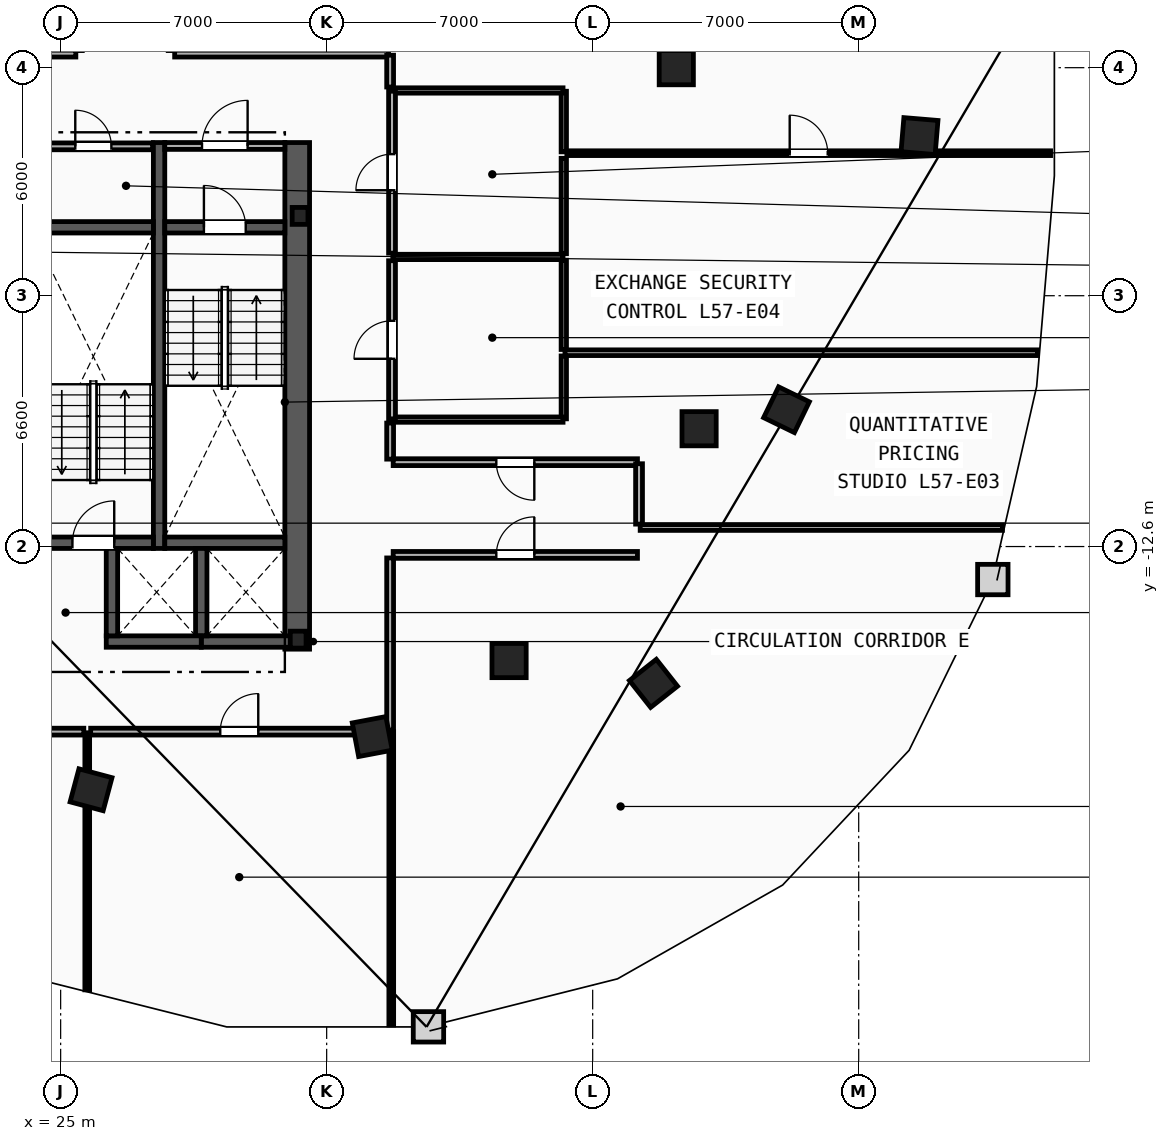
"""IFC4 building model, lengths in metres.
Left out: names, types, materials, properties, quantities, classifications, styles, units other than length and angle.
Written with IfcOpenShell. Run it as: python <this file> out.ifc"""

import sys

from ifc_helpers import new_model, si_unit, direction, frame, frame_2d, origin, origin_2d, place, context, subcontext, project, spatial, rectangle, i_section, extrude, element, fill, save


model = new_model("IFC4")
c1 = context("Model", 3, precision=1e-05, world=origin(), true_north=direction((0.0, 1.0)))
c2 = subcontext(c1, "Body", "Model", "MODEL_VIEW")
j1 = project(units=[si_unit("LENGTHUNIT", "METRE"), si_unit("PLANEANGLEUNIT", "RADIAN")], contexts=[c1])
p1 = place(None, origin())
s1 = spatial("IfcSite", under=j1, at=p1, CompositionType="ELEMENT")
p2 = place(p1, origin())
s2 = spatial("IfcBuilding", under=s1, at=p2, CompositionType="ELEMENT")
p3 = place(p2, frame((0.0, 0.0, 217.0)))
s3 = spatial("IfcBuildingStorey", under=s2, at=p3, CompositionType="ELEMENT", Elevation=217.0)
for number, where, z_axis, x_axis in (
    (1, (31.3, -3.9, 0.0), (0.0, 0.0, 1.0), (1.0, 0.0, 0.0)),
    (2, (31.25, -15.05, 0.0), (0.0, 0.0, 1.0), (1.0, 0.0, 0.0)),
):
    element("IfcColumn", number, at=place(p3, frame(where, z_axis=z_axis, x_axis=x_axis)), inside=s3, PredefinedType="COLUMN", context=c2, shape_type="SweptSolid", body=[
        extrude(i_section(OverallWidth=0.416, OverallDepth=0.446, WebThickness=0.039, FlangeThickness=0.063, FilletRadius=0.018, at=origin_2d()), origin(), (0.0, 0.0, 1.0), 3.6),
    ])
for number, where, z_axis, x_axis in (
    (3, (41.2, 0.0, 0.0), (0.0, 0.0, 1.0), (1.0, 0.0, 0.0)),
    (4, (41.8, -9.5, 0.0), (0.0, 0.0, 1.0), (1.0, 0.0, 0.0)),
    (5, (36.8, -15.6, 0.0), (0.0, 0.0, 1.0), (1.0, 0.0, 0.0)),
    (6, (25.8, -19.0, 0.0), (0.0, 0.0, 1.0), (0.966, -0.259, 0.0)),
    (7, (33.2, -17.6, 0.0), (0.0, 0.0, 1.0), (0.983, 0.186, 0.0)),
    (8, (40.6, -16.2, 0.0), (0.0, 0.0, 1.0), (0.785, 0.619, 0.0)),
    (9, (44.1, -9.0, 0.0), (0.0, 0.0, 1.0), (0.437, 0.899, 0.0)),
    (10, (47.6, -1.8, 0.0), (0.0, 0.0, 1.0), (0.084, 0.997, 0.0)),
):
    element("IfcColumn", number, at=place(p3, frame(where, z_axis=z_axis, x_axis=x_axis)), inside=s3, PredefinedType="COLUMN", context=c2, shape_type="SweptSolid", body=[
        extrude(rectangle(XDim=0.9, YDim=0.9, at=origin_2d()), origin(), (0.0, 0.0, 1.0), 3.6),
    ])
p4 = place(p3, frame((31.225, -15.3, 0.0), z_axis=(0.0, 0.0, 1.0), x_axis=(0.0, 1.0, 0.0)))
e11 = element("IfcWall", 11, at=p4, inside=s3, PredefinedType="SHEAR", context=c2, shape_type="SweptSolid", body=[
    extrude(rectangle(XDim=13.33, YDim=0.65, at=frame_2d((6.665, 0.0))), origin(), (0.0, 0.0, 1.0), 3.34),
])
p5 = place(p3, frame((27.59, -12.65, 0.0), z_axis=(0.0, 0.0, 1.0), x_axis=(0.0, 1.0, 0.0)))
e12 = element("IfcWall", 12, at=p5, inside=s3, PredefinedType="SHEAR", context=c2, shape_type="SweptSolid", body=[
    extrude(rectangle(XDim=10.68, YDim=0.3, at=frame_2d((5.34, 0.0))), origin(), (0.0, 0.0, 1.0), 3.34),
])
p6 = place(p3, frame((27.74, -4.2, 0.0), z_axis=(0.0, 0.0, 1.0), x_axis=(1.0, 0.0, 0.0)))
e13 = element("IfcWall", 13, at=p6, inside=s3, PredefinedType="SHEAR", context=c2, shape_type="SweptSolid", body=[
    extrude(rectangle(XDim=3.16, YDim=0.3, at=frame_2d((1.58, 0.0))), origin(), (0.0, 0.0, 1.0), 3.34),
])
p7 = place(p6, frame((1.03, 0.0, 0.0)))
e14 = element("IfcOpeningElement", 14, at=p7, cuts=e13, PredefinedType="OPENING", context=c2, shape_type="SweptSolid", body=[
    extrude(rectangle(XDim=1.1, YDim=2.15, at=frame_2d((0.55, 1.075))), frame((0.0, 0.16, 0.0), z_axis=(0.0, -1.0, 0.0), x_axis=(1.0, 0.0, 0.0)), (0.0, 0.0, 1.0), 0.32),
])
p8 = place(p3, frame((27.74, -12.5, 0.0), z_axis=(0.0, 0.0, 1.0), x_axis=(1.0, 0.0, 0.0)))
e15 = element("IfcWall", 15, at=p8, inside=s3, PredefinedType="SHEAR", context=c2, shape_type="SweptSolid", body=[
    extrude(rectangle(XDim=3.16, YDim=0.3, at=frame_2d((1.58, 0.0))), origin(), (0.0, 0.0, 1.0), 3.34),
])
p9 = place(p3, frame((24.28, -12.5, 0.0), z_axis=(0.0, 0.0, 1.0), x_axis=(1.0, 0.0, 0.0)))
e16 = element("IfcWall", 16, at=p9, inside=s3, PredefinedType="SHEAR", context=c2, shape_type="SweptSolid", body=[
    extrude(rectangle(XDim=3.16, YDim=0.3, at=frame_2d((1.58, 0.0))), origin(), (0.0, 0.0, 1.0), 3.34),
])
p10 = place(p9, frame((1.03, 0.0, 0.0)))
e17 = element("IfcOpeningElement", 17, at=p10, cuts=e16, PredefinedType="OPENING", context=c2, shape_type="SweptSolid", body=[
    extrude(rectangle(XDim=1.1, YDim=2.15, at=frame_2d((0.55, 1.075))), frame((0.0, 0.16, 0.0), z_axis=(0.0, -1.0, 0.0), x_axis=(1.0, 0.0, 0.0)), (0.0, 0.0, 1.0), 0.32),
])
p11 = place(p3, frame((24.28, -4.2, 0.0), z_axis=(0.0, 0.0, 1.0), x_axis=(1.0, 0.0, 0.0)))
e18 = element("IfcWall", 18, at=p11, inside=s3, PredefinedType="SHEAR", context=c2, shape_type="SweptSolid", body=[
    extrude(rectangle(XDim=3.16, YDim=0.3, at=frame_2d((1.58, 0.0))), origin(), (0.0, 0.0, 1.0), 3.34),
])
p12 = place(p3, frame((27.74, -2.06, 0.0), z_axis=(0.0, 0.0, 1.0), x_axis=(1.0, 0.0, 0.0)))
e19 = element("IfcWall", 19, at=p12, inside=s3, PredefinedType="PARTITIONING", context=c2, shape_type="SweptSolid", body=[
    extrude(rectangle(XDim=3.16, YDim=0.18, at=frame_2d((1.58, 0.0))), origin(), (0.0, 0.0, 1.0), 3.34),
])
p13 = place(p12, frame((0.98, 0.0, 0.0)))
e20 = element("IfcOpeningElement", 20, at=p13, cuts=e19, PredefinedType="OPENING", context=c2, shape_type="SweptSolid", body=[
    extrude(rectangle(XDim=1.2, YDim=2.15, at=frame_2d((0.6, 1.075))), frame((0.0, 0.1, 0.0), z_axis=(0.0, -1.0, 0.0), x_axis=(1.0, 0.0, 0.0)), (0.0, 0.0, 1.0), 0.2),
])
p14 = place(p3, frame((28.7, -15.1, 0.0), z_axis=(0.0, 0.0, 1.0), x_axis=(1.0, 0.0, 0.0)))
e21 = element("IfcWall", 21, at=p14, inside=s3, PredefinedType="SHEAR", context=c2, shape_type="SweptSolid", body=[
    extrude(rectangle(XDim=2.5, YDim=0.3, at=frame_2d((1.25, 0.0))), origin(), (0.0, 0.0, 1.0), 3.34),
])
p15 = place(p3, frame((28.7, -14.95, 0.0), z_axis=(0.0, 0.0, 1.0), x_axis=(0.0, 1.0, 0.0)))
e22 = element("IfcWall", 22, at=p15, inside=s3, PredefinedType="SHEAR", context=c2, shape_type="SweptSolid", body=[
    extrude(rectangle(XDim=2.3, YDim=0.3, at=frame_2d((1.15, 0.0))), origin(), (0.0, 0.0, 1.0), 3.34),
])
p16 = place(p3, frame((26.2, -15.1, 0.0), z_axis=(0.0, 0.0, 1.0), x_axis=(1.0, 0.0, 0.0)))
e23 = element("IfcWall", 23, at=p16, inside=s3, PredefinedType="SHEAR", context=c2, shape_type="SweptSolid", body=[
    extrude(rectangle(XDim=2.5, YDim=0.3, at=frame_2d((1.25, 0.0))), origin(), (0.0, 0.0, 1.0), 3.34),
])
p17 = place(p3, frame((26.35, -14.95, 0.0), z_axis=(0.0, 0.0, 1.0), x_axis=(0.0, 1.0, 0.0)))
e24 = element("IfcWall", 24, at=p17, inside=s3, PredefinedType="SHEAR", context=c2, shape_type="SweptSolid", body=[
    extrude(rectangle(XDim=2.3, YDim=0.3, at=frame_2d((1.15, 0.0))), origin(), (0.0, 0.0, 1.0), 3.34),
])
p18 = place(p3, frame((24.3, -2.07, 0.0), z_axis=(0.0, 0.0, 1.0), x_axis=(1.0, 0.0, 0.0)))
e25 = element("IfcWall", 25, at=p18, inside=s3, PredefinedType="PARTITIONING", context=c2, shape_type="SweptSolid", body=[
    extrude(rectangle(XDim=3.12, YDim=0.18, at=frame_2d((1.56, 0.0))), origin(), (0.0, 0.0, 1.0), 3.34),
])
p19 = place(p18, frame((1.085, 0.0, 0.0)))
e26 = element("IfcOpeningElement", 26, at=p19, cuts=e25, PredefinedType="OPENING", context=c2, shape_type="SweptSolid", body=[
    extrude(rectangle(XDim=0.95, YDim=2.1, at=frame_2d((0.475, 1.05))), frame((0.0, 0.1, 0.0), z_axis=(0.0, -1.0, 0.0), x_axis=(1.0, 0.0, 0.0)), (0.0, 0.0, 1.0), 0.2),
])
p20 = place(p3, frame((38.24, -9.24, 0.0), z_axis=(0.0, 0.0, 1.0), x_axis=(0.0, 1.0, 0.0)))
e27 = element("IfcWall", 27, at=p20, inside=s3, PredefinedType="PARTITIONING", context=c2, shape_type="SweptSolid", body=[
    extrude(rectangle(XDim=1.655, YDim=0.14, at=frame_2d((0.828, 0.0))), origin(), (0.0, 0.0, 1.0), 3.34),
])
p21 = place(p3, frame((38.24, -7.415, 0.0), z_axis=(0.0, 0.0, 1.0), x_axis=(0.0, 1.0, 0.0)))
e28 = element("IfcWall", 28, at=p21, inside=s3, PredefinedType="PARTITIONING", context=c2, shape_type="SweptSolid", body=[
    extrude(rectangle(XDim=2.35, YDim=0.14, at=frame_2d((1.175, 0.0))), origin(), (0.0, 0.0, 1.0), 3.34),
])
p22 = place(p3, frame((38.24, -4.895, 0.0), z_axis=(0.0, 0.0, 1.0), x_axis=(0.0, 1.0, 0.0)))
e29 = element("IfcWall", 29, at=p22, inside=s3, PredefinedType="PARTITIONING", context=c2, shape_type="SweptSolid", body=[
    extrude(rectangle(XDim=2.51, YDim=0.14, at=frame_2d((1.255, 0.0))), origin(), (0.0, 0.0, 1.0), 3.34),
])
p23 = place(p3, frame((38.24, -2.215, 0.0), z_axis=(0.0, 0.0, 1.0), x_axis=(0.0, 1.0, 0.0)))
e30 = element("IfcWall", 30, at=p23, inside=s3, PredefinedType="PARTITIONING", context=c2, shape_type="SweptSolid", body=[
    extrude(rectangle(XDim=1.595, YDim=0.14, at=frame_2d((0.797, 0.0))), origin(), (0.0, 0.0, 1.0), 3.34),
])
for number, where, z_axis, x_axis in (
    (31, (33.74, -0.6, 0.0), (0.0, 0.0, 1.0), (1.0, 0.0, 0.0)),
    (32, (33.74, -4.98, 0.0), (0.0, 0.0, 1.0), (1.0, 0.0, 0.0)),
    (33, (33.74, -9.26, 0.0), (0.0, 0.0, 1.0), (1.0, 0.0, 0.0)),
):
    element("IfcWall", number, at=place(p3, frame(where, z_axis=z_axis, x_axis=x_axis)), inside=s3, PredefinedType="PARTITIONING", context=c2, shape_type="SweptSolid", body=[
        extrude(rectangle(XDim=4.48, YDim=0.14, at=frame_2d((2.24, 0.0))), origin(), (0.0, 0.0, 1.0), 3.34),
    ])
p24 = place(p3, frame((33.72, -4.88, 0.0), z_axis=(0.0, 0.0, 1.0), x_axis=(0.0, 1.0, 0.0)))
e34 = element("IfcWall", 34, at=p24, inside=s3, PredefinedType="PARTITIONING", context=c2, shape_type="SweptSolid", body=[
    extrude(rectangle(XDim=4.26, YDim=0.18, at=frame_2d((2.13, 0.0))), origin(), (0.0, 0.0, 1.0), 3.34),
])
p25 = place(p24, frame((1.655, 0.0, 0.0)))
e35 = element("IfcOpeningElement", 35, at=p25, cuts=e34, PredefinedType="OPENING", context=c2, shape_type="SweptSolid", body=[
    extrude(rectangle(XDim=0.95, YDim=2.1, at=frame_2d((0.475, 1.05))), frame((0.0, 0.1, 0.0), z_axis=(0.0, -1.0, 0.0), x_axis=(1.0, 0.0, 0.0)), (0.0, 0.0, 1.0), 0.2),
])
p26 = place(p3, frame((33.72, -9.24, 0.0), z_axis=(0.0, 0.0, 1.0), x_axis=(0.0, 1.0, 0.0)))
e36 = element("IfcWall", 36, at=p26, inside=s3, PredefinedType="PARTITIONING", context=c2, shape_type="SweptSolid", body=[
    extrude(rectangle(XDim=4.16, YDim=0.18, at=frame_2d((2.08, 0.0))), origin(), (0.0, 0.0, 1.0), 3.34),
])
p27 = place(p26, frame((1.58, 0.0, 0.0)))
e37 = element("IfcOpeningElement", 37, at=p27, cuts=e36, PredefinedType="OPENING", context=c2, shape_type="SweptSolid", body=[
    extrude(rectangle(XDim=1.0, YDim=2.15, at=frame_2d((0.5, 1.075))), frame((0.0, 0.1, 0.0), z_axis=(0.0, -1.0, 0.0), x_axis=(1.0, 0.0, 0.0)), (0.0, 0.0, 1.0), 0.2),
])
p28 = place(p3, frame((38.27, -7.5, 0.0), z_axis=(0.0, 0.0, 1.0), x_axis=(1.0, 0.0, 0.0)))
e38 = element("IfcWall", 38, at=p28, inside=s3, PredefinedType="PARTITIONING", context=c2, shape_type="SweptSolid", body=[
    extrude(rectangle(XDim=12.438, YDim=0.15, at=frame_2d((6.219, 0.0))), origin(), (0.0, 0.0, 1.0), 3.34),
])
p29 = place(p3, frame((40.25, -12.1, 0.0), z_axis=(0.0, 0.0, 1.0), x_axis=(1.0, 0.0, 0.0)))
e39 = element("IfcWall", 39, at=p29, inside=s3, PredefinedType="PARTITIONING", context=c2, shape_type="SweptSolid", body=[
    extrude(rectangle(XDim=9.532, YDim=0.15, at=frame_2d((4.766, 0.0))), origin(), (0.0, 0.0, 1.0), 3.34),
])
p30 = place(p3, frame((25.7, -24.265, 0.0), z_axis=(0.0, 0.0, 1.0), x_axis=(0.0, 1.0, 0.0)))
e40 = element("IfcWall", 40, at=p30, inside=s3, PredefinedType="PARTITIONING", context=c2, shape_type="SweptSolid", body=[
    extrude(rectangle(XDim=6.765, YDim=0.125, at=frame_2d((3.382, 0.0))), origin(), (0.0, 0.0, 1.0), 3.34),
])
p31 = place(p3, frame((33.7, -25.19, 0.0), z_axis=(0.0, 0.0, 1.0), x_axis=(0.0, 1.0, 0.0)))
e41 = element("IfcWall", 41, at=p31, inside=s3, PredefinedType="PARTITIONING", context=c2, shape_type="SweptSolid", body=[
    extrude(rectangle(XDim=7.72, YDim=0.125, at=frame_2d((3.86, 0.0))), origin(), (0.0, 0.0, 1.0), 3.34),
])
p32 = place(p3, frame((25.79, -17.47, 0.0), z_axis=(0.0, 0.0, 1.0), x_axis=(1.0, 0.0, 0.0)))
e42 = element("IfcWall", 42, at=p32, inside=s3, PredefinedType="PARTITIONING", context=c2, shape_type="SweptSolid", body=[
    extrude(rectangle(XDim=7.82, YDim=0.18, at=frame_2d((3.91, 0.0))), origin(), (0.0, 0.0, 1.0), 3.34),
])
p33 = place(p32, frame((3.41, 0.0, 0.0)))
e43 = element("IfcOpeningElement", 43, at=p33, cuts=e42, PredefinedType="OPENING", context=c2, shape_type="SweptSolid", body=[
    extrude(rectangle(XDim=1.0, YDim=2.15, at=frame_2d((0.5, 1.075))), frame((0.0, 0.1, 0.0), z_axis=(0.0, -1.0, 0.0), x_axis=(1.0, 0.0, 0.0)), (0.0, 0.0, 1.0), 0.2),
])
p34 = place(p3, frame((33.75, -12.82, 0.0), z_axis=(0.0, 0.0, 1.0), x_axis=(1.0, 0.0, 0.0)))
e44 = element("IfcWall", 44, at=p34, inside=s3, PredefinedType="PARTITIONING", context=c2, shape_type="SweptSolid", body=[
    extrude(rectangle(XDim=6.428, YDim=0.18, at=frame_2d((3.214, 0.0))), origin(), (0.0, 0.0, 1.0), 3.34),
])
p35 = place(p34, frame((2.714, 0.0, 0.0)))
e45 = element("IfcOpeningElement", 45, at=p35, cuts=e44, PredefinedType="OPENING", context=c2, shape_type="SweptSolid", body=[
    extrude(rectangle(XDim=1.0, YDim=2.15, at=frame_2d((0.5, 1.075))), frame((0.0, 0.1, 0.0), z_axis=(0.0, -1.0, 0.0), x_axis=(1.0, 0.0, 0.0)), (0.0, 0.0, 1.0), 0.2),
])
p36 = place(p3, frame((33.67, -17.43, 0.0), z_axis=(0.0, 0.0, 1.0), x_axis=(0.0, 1.0, 0.0)))
e46 = element("IfcWall", 46, at=p36, inside=s3, PredefinedType="PARTITIONING", context=c2, shape_type="SweptSolid", body=[
    extrude(rectangle(XDim=4.53, YDim=0.18, at=frame_2d((2.265, 0.0))), origin(), (0.0, 0.0, 1.0), 3.34),
])
p37 = place(p3, frame((40.178, -10.38, 0.0), z_axis=(0.0, 0.0, 1.0), x_axis=(-1.0, 0.0, 0.0)))
e47 = element("IfcWall", 47, at=p37, inside=s3, PredefinedType="PARTITIONING", context=c2, shape_type="SweptSolid", body=[
    extrude(rectangle(XDim=6.428, YDim=0.18, at=frame_2d((3.214, 0.0))), origin(), (0.0, 0.0, 1.0), 3.34),
])
p38 = place(p37, frame((2.714, 0.0, 0.0)))
e48 = element("IfcOpeningElement", 48, at=p38, cuts=e47, PredefinedType="OPENING", context=c2, shape_type="SweptSolid", body=[
    extrude(rectangle(XDim=1.0, YDim=2.15, at=frame_2d((0.5, 1.075))), frame((0.0, 0.1, 0.0), z_axis=(0.0, -1.0, 0.0), x_axis=(1.0, 0.0, 0.0)), (0.0, 0.0, 1.0), 0.2),
])
p39 = place(p3, frame((40.22, -12.01, 0.0), z_axis=(0.0, 0.0, 1.0), x_axis=(0.0, 1.0, 0.0)))
e49 = element("IfcWall", 49, at=p39, inside=s3, PredefinedType="PARTITIONING", context=c2, shape_type="SweptSolid", body=[
    extrude(rectangle(XDim=1.589, YDim=0.18, at=frame_2d((0.794, 0.0))), origin(), (0.0, 0.0, 1.0), 3.34),
])
p40 = place(p3, frame((33.67, -10.3, 0.0), z_axis=(0.0, 0.0, 1.0), x_axis=(0.0, 1.0, 0.0)))
e50 = element("IfcWall", 50, at=p40, inside=s3, PredefinedType="PARTITIONING", context=c2, shape_type="SweptSolid", body=[
    extrude(rectangle(XDim=0.949, YDim=0.18, at=frame_2d((0.474, 0.0))), origin(), (0.0, 0.0, 1.0), 3.34),
])
p41 = place(p3, frame((16.822, -17.47, 0.0), z_axis=(0.0, 0.0, 1.0), x_axis=(1.0, 0.0, 0.0)))
e51 = element("IfcWall", 51, at=p41, inside=s3, PredefinedType="PARTITIONING", context=c2, shape_type="SweptSolid", body=[
    extrude(rectangle(XDim=8.789, YDim=0.18, at=frame_2d((4.394, 0.0))), origin(), (0.0, 0.0, 1.0), 3.34),
])
p42 = place(p3, frame((25.4, 0.37, 0.0), z_axis=(0.0, 0.0, 1.0), x_axis=(-1.0, 0.0, 0.0)))
e52 = element("IfcWall", 52, at=p42, inside=s3, PredefinedType="PARTITIONING", context=c2, shape_type="SweptSolid", body=[
    extrude(rectangle(XDim=8.578, YDim=0.18, at=frame_2d((4.289, 0.0))), origin(), (0.0, 0.0, 1.0), 3.34),
])
p43 = place(p3, frame((33.628, 0.37, 0.0), z_axis=(0.0, 0.0, 1.0), x_axis=(-1.0, 0.0, 0.0)))
e53 = element("IfcWall", 53, at=p43, inside=s3, PredefinedType="PARTITIONING", context=c2, shape_type="SweptSolid", body=[
    extrude(rectangle(XDim=5.628, YDim=0.18, at=frame_2d((2.814, 0.0))), origin(), (0.0, 0.0, 1.0), 3.34),
])
p44 = place(p3, frame((33.67, -0.509, 0.0), z_axis=(0.0, 0.0, 1.0), x_axis=(0.0, 1.0, 0.0)))
e54 = element("IfcWall", 54, at=p44, inside=s3, PredefinedType="PARTITIONING", context=c2, shape_type="SweptSolid", body=[
    extrude(rectangle(XDim=0.837, YDim=0.18, at=frame_2d((0.418, 0.0))), origin(), (0.0, 0.0, 1.0), 3.34),
])
p45 = place(p3, frame((38.32, -2.25, 0.0), z_axis=(0.0, 0.0, 1.0), x_axis=(1.0, 0.0, 0.0)))
e55 = element("IfcWall", 55, at=p45, inside=s3, PredefinedType="PARTITIONING", context=c2, shape_type="SweptSolid", body=[
    extrude(rectangle(XDim=12.729, YDim=0.125, at=frame_2d((6.365, 0.0))), origin(), (0.0, 0.0, 1.0), 3.34),
])
p46 = place(p45, frame((5.865, 0.0, 0.0)))
e56 = element("IfcOpeningElement", 56, at=p46, cuts=e55, PredefinedType="OPENING", context=c2, shape_type="SweptSolid", body=[
    extrude(rectangle(XDim=1.0, YDim=2.15, at=frame_2d((0.5, 1.075))), frame((0.0, 0.073, 0.0), z_axis=(0.0, -1.0, 0.0), x_axis=(1.0, 0.0, 0.0)), (0.0, 0.0, 1.0), 0.145),
])
p47 = place(p7, origin())
e57 = element("IfcDoor", 57, at=p47, inside=s3, OperationType="SINGLE_SWING_LEFT", PredefinedType="DOOR", context=c2, shape_type="SweptSolid", body=[
    extrude(rectangle(XDim=1.1, YDim=2.15, at=frame_2d((0.55, 1.075))), frame((0.0, 0.025, 0.0), z_axis=(0.0, -1.0, 0.0), x_axis=(1.0, 0.0, 0.0)), (0.0, 0.0, 1.0), 0.05),
])
fill(e14, e57)
p48 = place(p10, origin())
e58 = element("IfcDoor", 58, at=p48, inside=s3, OperationType="SINGLE_SWING_RIGHT", PredefinedType="DOOR", context=c2, shape_type="SweptSolid", body=[
    extrude(rectangle(XDim=1.1, YDim=2.15, at=frame_2d((0.55, 1.075))), frame((0.0, 0.025, 0.0), z_axis=(0.0, -1.0, 0.0), x_axis=(1.0, 0.0, 0.0)), (0.0, 0.0, 1.0), 0.05),
])
fill(e17, e58)
p49 = place(p13, origin())
e59 = element("IfcDoor", 59, at=p49, inside=s3, OperationType="SINGLE_SWING_RIGHT", PredefinedType="DOOR", context=c2, shape_type="SweptSolid", body=[
    extrude(rectangle(XDim=1.2, YDim=2.15, at=frame_2d((0.6, 1.075))), frame((0.0, 0.025, 0.0), z_axis=(0.0, -1.0, 0.0), x_axis=(1.0, 0.0, 0.0)), (0.0, 0.0, 1.0), 0.05),
])
fill(e20, e59)
p50 = place(p46, origin())
e60 = element("IfcDoor", 60, at=p50, inside=s3, OperationType="SINGLE_SWING_LEFT", PredefinedType="DOOR", context=c2, shape_type="SweptSolid", body=[
    extrude(rectangle(XDim=1.0, YDim=2.15, at=frame_2d((0.5, 1.075))), frame((0.0, 0.025, 0.0), z_axis=(0.0, -1.0, 0.0), x_axis=(1.0, 0.0, 0.0)), (0.0, 0.0, 1.0), 0.05),
])
fill(e56, e60)
p51 = place(p33, origin())
e61 = element("IfcDoor", 61, at=p51, inside=s3, OperationType="SINGLE_SWING_RIGHT", PredefinedType="DOOR", context=c2, shape_type="SweptSolid", body=[
    extrude(rectangle(XDim=1.0, YDim=2.15, at=frame_2d((0.5, 1.075))), frame((0.0, 0.025, 0.0), z_axis=(0.0, -1.0, 0.0), x_axis=(1.0, 0.0, 0.0)), (0.0, 0.0, 1.0), 0.05),
])
fill(e43, e61)
p52 = place(p35, origin())
e62 = element("IfcDoor", 62, at=p52, inside=s3, OperationType="SINGLE_SWING_RIGHT", PredefinedType="DOOR", context=c2, shape_type="SweptSolid", body=[
    extrude(rectangle(XDim=1.0, YDim=2.15, at=frame_2d((0.5, 1.075))), frame((0.0, 0.025, 0.0), z_axis=(0.0, -1.0, 0.0), x_axis=(1.0, 0.0, 0.0)), (0.0, 0.0, 1.0), 0.05),
])
fill(e45, e62)
p53 = place(p38, origin())
e63 = element("IfcDoor", 63, at=p53, inside=s3, OperationType="SINGLE_SWING_LEFT", PredefinedType="DOOR", context=c2, shape_type="SweptSolid", body=[
    extrude(rectangle(XDim=1.0, YDim=2.15, at=frame_2d((0.5, 1.075))), frame((0.0, 0.025, 0.0), z_axis=(0.0, -1.0, 0.0), x_axis=(1.0, 0.0, 0.0)), (0.0, 0.0, 1.0), 0.05),
])
fill(e48, e63)
p54 = place(p25, origin())
e64 = element("IfcDoor", 64, at=p54, inside=s3, OperationType="SINGLE_SWING_LEFT", PredefinedType="DOOR", context=c2, shape_type="SweptSolid", body=[
    extrude(rectangle(XDim=0.95, YDim=2.1, at=frame_2d((0.475, 1.05))), frame((0.0, 0.025, 0.0), z_axis=(0.0, -1.0, 0.0), x_axis=(1.0, 0.0, 0.0)), (0.0, 0.0, 1.0), 0.05),
])
fill(e35, e64)
p55 = place(p27, origin())
e65 = element("IfcDoor", 65, at=p55, inside=s3, OperationType="SINGLE_SWING_LEFT", PredefinedType="DOOR", context=c2, shape_type="SweptSolid", body=[
    extrude(rectangle(XDim=1.0, YDim=2.15, at=frame_2d((0.5, 1.075))), frame((0.0, 0.025, 0.0), z_axis=(0.0, -1.0, 0.0), x_axis=(1.0, 0.0, 0.0)), (0.0, 0.0, 1.0), 0.05),
])
fill(e37, e65)
p56 = place(p19, origin())
e66 = element("IfcDoor", 66, at=p56, inside=s3, OperationType="SINGLE_SWING_LEFT", PredefinedType="DOOR", context=c2, shape_type="SweptSolid", body=[
    extrude(rectangle(XDim=0.95, YDim=2.1, at=frame_2d((0.475, 1.05))), frame((0.0, 0.025, 0.0), z_axis=(0.0, -1.0, 0.0), x_axis=(1.0, 0.0, 0.0)), (0.0, 0.0, 1.0), 0.05),
])
fill(e26, e66)
save(model, sys.argv[1])
